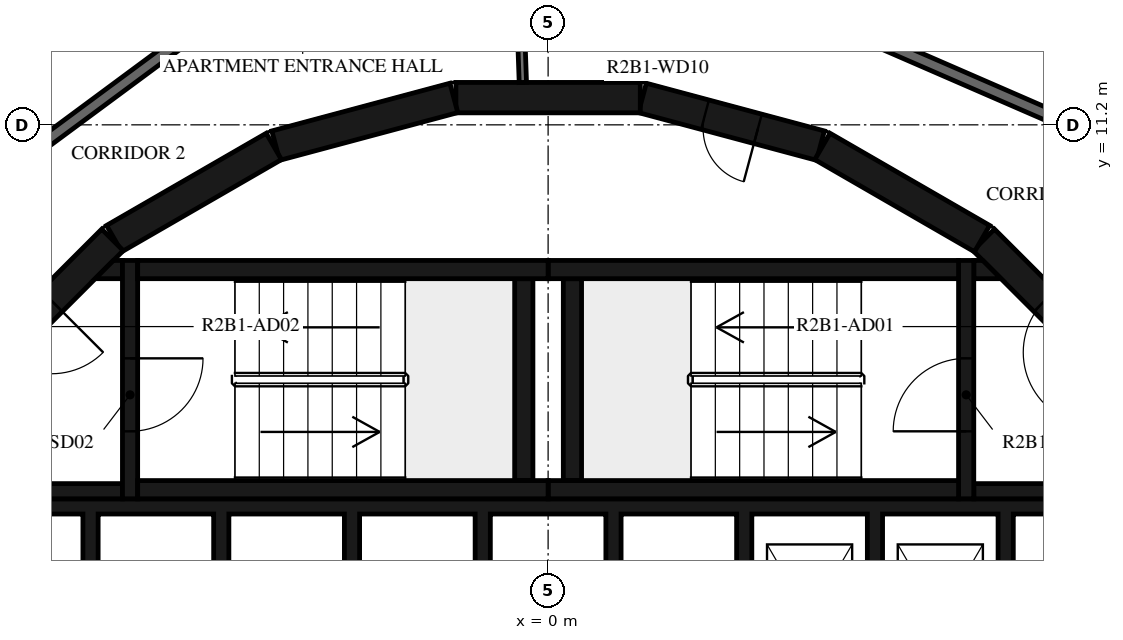
"""IFC4 building model, lengths in metres.
Left out: names, types, materials, properties, quantities, classifications, styles, units other than length and angle.
Written with IfcOpenShell. Run it as: python <this file> out.ifc"""

import sys

from ifc_helpers import new_model, si_unit, direction, frame, frame_2d, origin, place, context, subcontext, project, spatial, polyline, rectangle, outline, extrude, element, fill, save


model = new_model("IFC4")
c1 = context("Model", 3, precision=1e-05, world=origin(), true_north=direction((0.0, 1.0)))
c2 = subcontext(c1, "Body", "Model", "MODEL_VIEW")
j1 = project(units=[si_unit("LENGTHUNIT", "METRE"), si_unit("PLANEANGLEUNIT", "RADIAN")], contexts=[c1])
p1 = place(None, origin())
s1 = spatial("IfcSite", under=j1, at=p1, CompositionType="ELEMENT")
p2 = place(p1, origin())
s2 = spatial("IfcBuilding", under=s1, at=p2, CompositionType="ELEMENT")
p3 = place(p2, frame((0.0, 0.0, 87.2)))
s3 = spatial("IfcBuildingStorey", under=s2, at=p3, CompositionType="ELEMENT", Elevation=87.2)
p4 = place(p3, frame((9.308, 7.164, 0.0), z_axis=(0.0, 0.0, 1.0), x_axis=(-0.707106781187, 0.707106781187, 0.0)))
e1 = element("IfcWall", 1, at=p4, inside=s3, PredefinedType="SHEAR", context=c2, shape_type="SweptSolid", body=[
    extrude(rectangle(XDim=3.032, YDim=0.5, at=frame_2d((1.516, 0.0))), origin(), (0.0, 0.0, 1.0), 3.12),
])
p5 = place(p4, frame((0.416, 0.0, 0.0)))
e2 = element("IfcOpeningElement", 2, at=p5, cuts=e1, PredefinedType="OPENING", context=c2, shape_type="SweptSolid", body=[
    extrude(rectangle(XDim=1.2, YDim=2.1, at=frame_2d((0.6, 1.05))), frame((0.0, 0.26, 0.0), z_axis=(0.0, -1.0, 0.0), x_axis=(1.0, 0.0, 0.0)), (0.0, 0.0, 1.0), 0.52),
])
p6 = place(p3, frame((7.137, 9.329, 0.0), z_axis=(0.0, 0.0, 1.0), x_axis=(-0.865975092491, 0.500087131594, 0.0)))
e3 = element("IfcWall", 3, at=p6, inside=s3, PredefinedType="SHEAR", context=c2, shape_type="SweptSolid", body=[
    extrude(rectangle(XDim=3.033, YDim=0.5, at=frame_2d((1.516, 0.0))), origin(), (0.0, 0.0, 1.0), 3.12),
])
p7 = place(p3, frame((4.479, 10.858, 0.0), z_axis=(0.0, 0.0, 1.0), x_axis=(-0.965948410781, 0.258734743916, 0.0)))
e4 = element("IfcWall", 4, at=p7, inside=s3, PredefinedType="SHEAR", context=c2, shape_type="SweptSolid", body=[
    extrude(rectangle(XDim=3.033, YDim=0.5, at=frame_2d((1.516, 0.0))), origin(), (0.0, 0.0, 1.0), 3.12),
])
p8 = place(p7, frame((1.066, 0.0, 0.0)))
e5 = element("IfcOpeningElement", 5, at=p8, cuts=e4, PredefinedType="OPENING", context=c2, shape_type="SweptSolid", body=[
    extrude(rectangle(XDim=0.9, YDim=2.1, at=frame_2d((0.45, 1.05))), frame((0.0, 0.26, 0.0), z_axis=(0.0, -1.0, 0.0), x_axis=(1.0, 0.0, 0.0)), (0.0, 0.0, 1.0), 0.52),
])
for number, where, z_axis, x_axis in (
    (6, (1.516, 11.647, 0.0), (0.0, 0.0, 1.0), (-1.0, 0.0, 0.0)),
    (7, (-1.55, 11.643, 0.0), (0.0, 0.0, 1.0), (-0.966, -0.259, 0.0)),
    (8, (-4.51, 10.845, 0.0), (0.0, 0.0, 1.0), (-0.866, -0.5, 0.0)),
):
    element("IfcWall", number, at=place(p3, frame(where, z_axis=z_axis, x_axis=x_axis)), inside=s3, PredefinedType="SHEAR", context=c2, shape_type="SweptSolid", body=[
        extrude(rectangle(XDim=3.033, YDim=0.5, at=frame_2d((1.516, 0.0))), origin(), (0.0, 0.0, 1.0), 3.12),
    ])
p9 = place(p3, frame((-7.164, 9.308, 0.0), z_axis=(0.0, 0.0, 1.0), x_axis=(-0.707106781187, -0.707106781187, 0.0)))
e9 = element("IfcWall", 9, at=p9, inside=s3, PredefinedType="SHEAR", context=c2, shape_type="SweptSolid", body=[
    extrude(rectangle(XDim=3.032, YDim=0.5, at=frame_2d((1.516, 0.0))), origin(), (0.0, 0.0, 1.0), 3.12),
])
p10 = place(p9, frame((1.416, 0.0, 0.0)))
e10 = element("IfcOpeningElement", 10, at=p10, cuts=e9, PredefinedType="OPENING", context=c2, shape_type="SweptSolid", body=[
    extrude(rectangle(XDim=1.2, YDim=2.1, at=frame_2d((0.6, 1.05))), frame((0.0, 0.26, 0.0), z_axis=(0.0, -1.0, 0.0), x_axis=(1.0, 0.0, 0.0)), (0.0, 0.0, 1.0), 0.52),
])
for number, where, z_axis, x_axis in (
    (11, (0.0, 5.2, 0.0), (0.0, 0.0, 1.0), (1.0, 0.0, 0.0)),
    (12, (0.0, 8.82, 0.0), (0.0, 0.0, 1.0), (1.0, 0.0, 0.0)),
):
    element("IfcWall", number, at=place(p3, frame(where, z_axis=z_axis, x_axis=x_axis)), inside=s3, PredefinedType="SHEAR", context=c2, shape_type="SweptSolid", body=[
        extrude(rectangle(XDim=6.75, YDim=0.3, at=frame_2d((3.375, 0.0))), origin(), (0.0, 0.0, 1.0), 3.12),
    ])
p11 = place(p3, frame((0.4, 5.35, 0.0), z_axis=(0.0, 0.0, 1.0), x_axis=(0.0, 1.0, 0.0)))
e13 = element("IfcWall", 13, at=p11, inside=s3, PredefinedType="SHEAR", context=c2, shape_type="SweptSolid", body=[
    extrude(rectangle(XDim=3.32, YDim=0.3, at=frame_2d((1.66, 0.0))), origin(), (0.0, 0.0, 1.0), 3.12),
])
p12 = place(p3, frame((6.875, 5.05, 0.0), z_axis=(0.0, 0.0, 1.0), x_axis=(0.0, 1.0, 0.0)))
e14 = element("IfcWall", 14, at=p12, inside=s3, PredefinedType="SHEAR", context=c2, shape_type="SweptSolid", body=[
    extrude(rectangle(XDim=3.92, YDim=0.25, at=frame_2d((1.96, 0.0))), origin(), (0.0, 0.0, 1.0), 3.12),
])
p13 = place(p12, frame((1.11, 0.0, 0.0)))
e15 = element("IfcOpeningElement", 15, at=p13, cuts=e14, PredefinedType="OPENING", context=c2, shape_type="SweptSolid", body=[
    extrude(rectangle(XDim=1.2, YDim=2.1, at=frame_2d((0.6, 1.05))), frame((0.0, 0.135, 0.0), z_axis=(0.0, -1.0, 0.0), x_axis=(1.0, 0.0, 0.0)), (0.0, 0.0, 1.0), 0.27),
])
p14 = place(p3, frame((7.0, 5.175, 0.0), z_axis=(0.0, 0.0, 1.0), x_axis=(1.0, 0.0, 0.0)))
e16 = element("IfcWall", 16, at=p14, inside=s3, PredefinedType="SHEAR", context=c2, shape_type="SweptSolid", body=[
    extrude(rectangle(XDim=3.1, YDim=0.25, at=frame_2d((1.55, 0.0))), origin(), (0.0, 0.0, 1.0), 3.12),
])
p15 = place(p3, origin())
e17 = element("IfcWall", 17, at=p15, inside=s3, PredefinedType="SHEAR", context=c2, shape_type="SweptSolid", body=[
    extrude(outline(polyline([(7.448, 8.67), (7.0, 8.67), (7.0, 8.97), (7.148, 8.97), (7.448, 8.67)])), origin(), (0.0, 0.0, 1.0), 3.12),
])
for number, where, z_axis, x_axis in (
    (18, (-6.75, 5.2, 0.0), (0.0, 0.0, 1.0), (1.0, 0.0, 0.0)),
    (19, (-6.75, 8.82, 0.0), (0.0, 0.0, 1.0), (1.0, 0.0, 0.0)),
):
    element("IfcWall", number, at=place(p3, frame(where, z_axis=z_axis, x_axis=x_axis)), inside=s3, PredefinedType="SHEAR", context=c2, shape_type="SweptSolid", body=[
        extrude(rectangle(XDim=6.75, YDim=0.3, at=frame_2d((3.375, 0.0))), origin(), (0.0, 0.0, 1.0), 3.12),
    ])
p16 = place(p3, frame((-0.4, 5.35, 0.0), z_axis=(0.0, 0.0, 1.0), x_axis=(0.0, 1.0, 0.0)))
e20 = element("IfcWall", 20, at=p16, inside=s3, PredefinedType="SHEAR", context=c2, shape_type="SweptSolid", body=[
    extrude(rectangle(XDim=3.32, YDim=0.3, at=frame_2d((1.66, 0.0))), origin(), (0.0, 0.0, 1.0), 3.12),
])
p17 = place(p3, frame((-6.875, 8.97, 0.0), z_axis=(0.0, 0.0, 1.0), x_axis=(0.0, -1.0, 0.0)))
e21 = element("IfcWall", 21, at=p17, inside=s3, PredefinedType="SHEAR", context=c2, shape_type="SweptSolid", body=[
    extrude(rectangle(XDim=3.92, YDim=0.25, at=frame_2d((1.96, 0.0))), origin(), (0.0, 0.0, 1.0), 3.12),
])
p18 = place(p17, frame((1.61, 0.0, 0.0)))
e22 = element("IfcOpeningElement", 22, at=p18, cuts=e21, PredefinedType="OPENING", context=c2, shape_type="SweptSolid", body=[
    extrude(rectangle(XDim=1.2, YDim=2.1, at=frame_2d((0.6, 1.05))), frame((0.0, 0.135, 0.0), z_axis=(0.0, -1.0, 0.0), x_axis=(1.0, 0.0, 0.0)), (0.0, 0.0, 1.0), 0.27),
])
p19 = place(p3, frame((-7.0, 5.175, 0.0), z_axis=(0.0, 0.0, 1.0), x_axis=(-1.0, 0.0, 0.0)))
e23 = element("IfcWall", 23, at=p19, inside=s3, PredefinedType="SHEAR", context=c2, shape_type="SweptSolid", body=[
    extrude(rectangle(XDim=3.1, YDim=0.25, at=frame_2d((1.55, 0.0))), origin(), (0.0, 0.0, 1.0), 3.12),
])
p20 = place(p3, origin())
e24 = element("IfcWall", 24, at=p20, inside=s3, PredefinedType="SHEAR", context=c2, shape_type="SweptSolid", body=[
    extrude(outline(polyline([(-7.148, 8.97), (-7.0, 8.97), (-7.0, 8.67), (-7.448, 8.67), (-7.148, 8.97)])), origin(), (0.0, 0.0, 1.0), 3.12),
])
p21 = place(p3, origin())
e25 = element("IfcWall", 25, at=p21, inside=s3, PredefinedType="SHEAR", context=c2, shape_type="SweptSolid", body=[
    extrude(outline(polyline([(-9.55, 4.8), (-7.65, 4.8), (-7.65, 1.9), (-7.4, 1.9), (-7.4, 4.8), (-5.5, 4.8), (-5.5, 1.9), (-5.25, 1.9), (-5.25, 4.8), (-3.35, 4.8), (-3.35, 1.9), (-3.1, 1.9), (-3.1, 4.8), (-1.2, 4.8), (-1.2, 1.9), (-0.95, 1.9), (-0.95, 4.8), (0.95, 4.8), (0.95, 1.9), (1.2, 1.9), (1.2, 4.8), (3.1, 4.8), (3.1, 1.9), (3.35, 1.9), (3.35, 4.8), (5.25, 4.8), (5.25, 1.9), (5.5, 1.9), (5.5, 4.8), (7.4, 4.8), (7.4, 1.9), (7.65, 1.9), (7.65, 4.8), (9.55, 4.8), (9.55, 1.9), (9.8, 1.9), (9.8, 4.8), (9.8, 5.05), (-9.8, 5.05), (-9.8, 4.8), (-9.8, 1.9), (-9.55, 1.9), (-9.55, 4.8)])), origin(), (0.0, 0.0, 1.0), 3.12),
])
p22 = place(p3, frame((-0.479, 13.734, 0.0), z_axis=(0.0, 0.0, 1.0), x_axis=(0.034805430832, -0.999394107439, 0.0)))
e26 = element("IfcWall", 26, at=p22, inside=s3, PredefinedType="PARTITIONING", context=c2, shape_type="SweptSolid", body=[
    extrude(rectangle(XDim=1.838, YDim=0.12, at=frame_2d((0.919, 0.0))), origin(), (0.0, 0.0, 1.0), 3.12),
])
p23 = place(p22, frame((0.115, 0.0, 0.0)))
e27 = element("IfcOpeningElement", 27, at=p23, cuts=e26, PredefinedType="OPENING", context=c2, shape_type="SweptSolid", body=[
    extrude(rectangle(XDim=1.2, YDim=2.1, at=frame_2d((0.6, 1.05))), frame((0.0, 0.07, 0.0), z_axis=(0.0, -1.0, 0.0), x_axis=(1.0, 0.0, 0.0)), (0.0, 0.0, 1.0), 0.14),
])
p24 = place(p3, frame((8.829, 11.1, 0.0), z_axis=(0.0, 0.0, 1.0), x_axis=(-0.917063183388, 0.398741918631, 0.0)))
e28 = element("IfcWall", 28, at=p24, inside=s3, PredefinedType="STANDARD", context=c2, shape_type="SweptSolid", body=[
    extrude(rectangle(XDim=7.342, YDim=0.2, at=frame_2d((3.671, 0.0))), origin(), (0.0, 0.0, 1.0), 3.12),
])
p25 = place(p3, frame((-5.198, 13.196, 0.0), z_axis=(0.0, 0.0, 1.0), x_axis=(-0.803864151363, -0.594812933748, 0.0)))
e29 = element("IfcWall", 29, at=p25, inside=s3, PredefinedType="STANDARD", context=c2, shape_type="SweptSolid", body=[
    extrude(rectangle(XDim=7.24, YDim=0.2, at=frame_2d((3.62, 0.0))), origin(), (0.0, 0.0, 1.0), 3.12),
])
p26 = place(p25, frame((5.7, 0.0, 0.0)))
e30 = element("IfcOpeningElement", 30, at=p26, cuts=e29, PredefinedType="OPENING", context=c2, shape_type="SweptSolid", body=[
    extrude(rectangle(XDim=1.0, YDim=2.1, at=frame_2d((0.5, 1.05))), frame((0.0, 0.11, 0.0), z_axis=(0.0, -1.0, 0.0), x_axis=(1.0, 0.0, 0.0)), (0.0, 0.0, 1.0), 0.22),
])
p27 = place(p3, frame((9.796, 12.315, 0.0), z_axis=(0.0, 0.0, 1.0), x_axis=(-0.917053660722, 0.398763819017, 0.0)))
e31 = element("IfcWall", 31, at=p27, inside=s3, PredefinedType="PARTITIONING", context=c2, shape_type="SweptSolid", body=[
    extrude(rectangle(XDim=7.576, YDim=0.12, at=frame_2d((3.788, 0.0))), origin(), (0.0, 0.0, 1.0), 3.12),
])
p28 = place(p27, frame((2.185, 0.0, 0.0)))
e32 = element("IfcOpeningElement", 32, at=p28, cuts=e31, PredefinedType="OPENING", context=c2, shape_type="SweptSolid", body=[
    extrude(rectangle(XDim=0.8, YDim=2.1, at=frame_2d((0.4, 1.05))), frame((0.0, 0.07, 0.0), z_axis=(0.0, -1.0, 0.0), x_axis=(1.0, 0.0, 0.0)), (0.0, 0.0, 1.0), 0.14),
])
p29 = place(p3, frame((-5.767, 14.641, 0.0), z_axis=(0.0, 0.0, 1.0), x_axis=(-0.803853364238, -0.594827511807, 0.0)))
e33 = element("IfcWall", 33, at=p29, inside=s3, PredefinedType="PARTITIONING", context=c2, shape_type="SweptSolid", body=[
    extrude(rectangle(XDim=8.146, YDim=0.12, at=frame_2d((4.073, 0.0))), origin(), (0.0, 0.0, 1.0), 3.12),
])
p30 = place(p29, frame((0.97, 0.0, 0.0)))
e34 = element("IfcOpeningElement", 34, at=p30, cuts=e33, PredefinedType="OPENING", context=c2, shape_type="SweptSolid", body=[
    extrude(rectangle(XDim=0.8, YDim=2.1, at=frame_2d((0.4, 1.05))), frame((0.0, 0.07, 0.0), z_axis=(0.0, -1.0, 0.0), x_axis=(1.0, 0.0, 0.0)), (0.0, 0.0, 1.0), 0.14),
])
p31 = place(p3, frame((-5.952, 23.571, 0.0), z_axis=(0.0, 0.0, 1.0), x_axis=(-0.398745097158, -0.917061801348, 0.0)))
e35 = element("IfcWall", 35, at=p31, inside=s3, PredefinedType="PARTITIONING", context=c2, shape_type="SweptSolid", body=[
    extrude(rectangle(XDim=14.576, YDim=0.12, at=frame_2d((7.288, 0.0))), origin(), (0.0, 0.0, 1.0), 3.12),
])
p32 = place(p31, frame((3.201, 0.0, 0.0)))
e36 = element("IfcOpeningElement", 36, at=p32, cuts=e35, PredefinedType="OPENING", context=c2, shape_type="SweptSolid", body=[
    extrude(rectangle(XDim=0.9, YDim=2.1, at=frame_2d((0.45, 1.05))), frame((0.0, 0.07, 0.0), z_axis=(0.0, -1.0, 0.0), x_axis=(1.0, 0.0, 0.0)), (0.0, 0.0, 1.0), 0.14),
])
p33 = place(p31, frame((0.2, 0.0, 0.0)))
e37 = element("IfcOpeningElement", 37, at=p33, cuts=e35, PredefinedType="OPENING", context=c2, shape_type="SweptSolid", body=[
    extrude(rectangle(XDim=0.9, YDim=2.1, at=frame_2d((0.45, 1.05))), frame((0.0, 0.07, 0.0), z_axis=(0.0, -1.0, 0.0), x_axis=(1.0, 0.0, 0.0)), (0.0, 0.0, 1.0), 0.14),
])
p34 = place(p13, origin())
e38 = element("IfcDoor", 38, at=p34, inside=s3, OperationType="SINGLE_SWING_LEFT", PredefinedType="DOOR", context=c2, shape_type="SweptSolid", body=[
    extrude(rectangle(XDim=1.2, YDim=2.1, at=frame_2d((0.6, 1.05))), frame((0.0, 0.025, 0.0), z_axis=(0.0, -1.0, 0.0), x_axis=(1.0, 0.0, 0.0)), (0.0, 0.0, 1.0), 0.05),
])
fill(e15, e38)
p35 = place(p5, origin())
e39 = element("IfcDoor", 39, at=p35, inside=s3, OperationType="SINGLE_SWING_RIGHT", PredefinedType="DOOR", context=c2, shape_type="SweptSolid", body=[
    extrude(rectangle(XDim=1.2, YDim=2.1, at=frame_2d((0.6, 1.05))), frame((0.0, 0.025, 0.0), z_axis=(0.0, -1.0, 0.0), x_axis=(1.0, 0.0, 0.0)), (0.0, 0.0, 1.0), 0.05),
])
fill(e2, e39)
p36 = place(p18, origin())
e40 = element("IfcDoor", 40, at=p36, inside=s3, OperationType="SINGLE_SWING_LEFT", PredefinedType="DOOR", context=c2, shape_type="SweptSolid", body=[
    extrude(rectangle(XDim=1.2, YDim=2.1, at=frame_2d((0.6, 1.05))), frame((0.0, 0.025, 0.0), z_axis=(0.0, -1.0, 0.0), x_axis=(1.0, 0.0, 0.0)), (0.0, 0.0, 1.0), 0.05),
])
fill(e22, e40)
p37 = place(p10, origin())
e41 = element("IfcDoor", 41, at=p37, inside=s3, OperationType="SINGLE_SWING_RIGHT", PredefinedType="DOOR", context=c2, shape_type="SweptSolid", body=[
    extrude(rectangle(XDim=1.2, YDim=2.1, at=frame_2d((0.6, 1.05))), frame((0.0, 0.025, 0.0), z_axis=(0.0, -1.0, 0.0), x_axis=(1.0, 0.0, 0.0)), (0.0, 0.0, 1.0), 0.05),
])
fill(e10, e41)
p38 = place(p8, origin())
e42 = element("IfcDoor", 42, at=p38, inside=s3, OperationType="SINGLE_SWING_LEFT", PredefinedType="DOOR", context=c2, shape_type="SweptSolid", body=[
    extrude(rectangle(XDim=0.9, YDim=2.1, at=frame_2d((0.45, 1.05))), frame((0.0, 0.025, 0.0), z_axis=(0.0, -1.0, 0.0), x_axis=(1.0, 0.0, 0.0)), (0.0, 0.0, 1.0), 0.05),
])
fill(e5, e42)
save(model, sys.argv[1])
